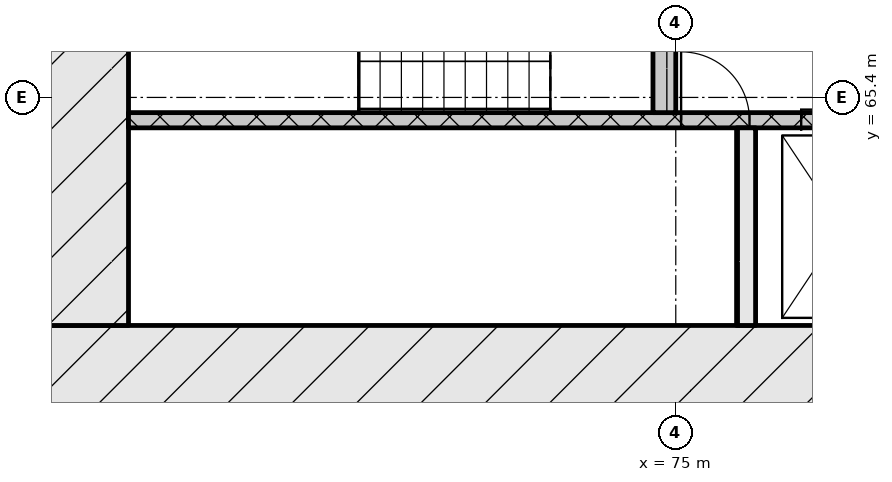
"""IFC4 building model, lengths in metres.
Left out: names, types, materials, properties, quantities, classifications, styles, units other than length and angle.
Written with IfcOpenShell. Run it as: python <this file> out.ifc"""

import sys

from ifc_helpers import new_model, si_unit, direction, frame, frame_2d, origin, place, context, subcontext, project, spatial, rectangle, extrude, element, fill, save


model = new_model("IFC4")
c1 = context("Model", 3, precision=1e-05, world=origin(), true_north=direction((0.0, 1.0)))
c2 = subcontext(c1, "Body", "Model", "MODEL_VIEW")
j1 = project(units=[si_unit("LENGTHUNIT", "METRE"), si_unit("PLANEANGLEUNIT", "RADIAN")], contexts=[c1])
p1 = place(None, origin())
s1 = spatial("IfcSite", under=j1, at=p1, CompositionType="ELEMENT")
p2 = place(p1, origin())
s2 = spatial("IfcBuilding", under=s1, at=p2, CompositionType="ELEMENT")
p3 = place(p2, frame((0.0, 0.0, 40.8)))
s3 = spatial("IfcBuildingStorey", under=s2, at=p3, CompositionType="ELEMENT", Elevation=40.8)
p4 = place(p3, frame((66.6, 61.8, 0.0), z_axis=(0.0, 0.0, 1.0), x_axis=(1.0, 0.0, 0.0)))
e1 = element("IfcWall", 1, at=p4, inside=s3, PredefinedType="SOLIDWALL", context=c2, shape_type="SweptSolid", body=[
    extrude(rectangle(XDim=42.0, YDim=1.2, at=frame_2d((21.0, 0.0))), origin(), (0.0, 0.0, 1.0), 3.32),
])
p5 = place(p4, frame((21.35, 0.0, 0.0)))
e2 = element("IfcOpeningElement", 2, at=p5, cuts=e1, PredefinedType="OPENING", context=c2, shape_type="SweptSolid", body=[
    extrude(rectangle(XDim=1.8, YDim=2.1, at=frame_2d((0.9, 1.05))), frame((0.0, 0.61, 0.0), z_axis=(0.0, -1.0, 0.0), x_axis=(1.0, 0.0, 0.0)), (0.0, 0.0, 1.0), 1.22),
])
p6 = place(p3, frame((67.2, 62.4, 0.0), z_axis=(0.0, 0.0, 1.0), x_axis=(0.0, 1.0, 0.0)))
e3 = element("IfcWall", 3, at=p6, inside=s3, PredefinedType="SOLIDWALL", context=c2, shape_type="SweptSolid", body=[
    extrude(rectangle(XDim=12.0, YDim=1.2, at=frame_2d((6.0, 0.0))), origin(), (0.0, 0.0, 1.0), 3.32),
])
p7 = place(p6, frame((6.45, 0.0, 0.0)))
e4 = element("IfcOpeningElement", 4, at=p7, cuts=e3, PredefinedType="OPENING", context=c2, shape_type="SweptSolid", body=[
    extrude(rectangle(XDim=1.2, YDim=2.1, at=frame_2d((0.6, 1.05))), frame((0.0, 0.61, 0.0), z_axis=(0.0, -1.0, 0.0), x_axis=(1.0, 0.0, 0.0)), (0.0, 0.0, 1.0), 1.22),
])
p8 = place(p3, frame((75.925, 62.4, 0.0), z_axis=(0.0, 0.0, 1.0), x_axis=(0.0, 1.0, 0.0)))
e5 = element("IfcWall", 5, at=p8, inside=s3, PredefinedType="SOLIDWALL", context=c2, shape_type="SweptSolid", body=[
    extrude(rectangle(XDim=2.6, YDim=0.25, at=frame_2d((1.3, 0.0))), origin(), (0.0, 0.0, 1.0), 3.32),
])
p9 = place(p3, frame((67.8, 65.1, 0.0), z_axis=(0.0, 0.0, 1.0), x_axis=(1.0, 0.0, 0.0)))
e6 = element("IfcWall", 6, at=p9, inside=s3, PredefinedType="SOLIDWALL", context=c2, shape_type="SweptSolid", body=[
    extrude(rectangle(XDim=18.5, YDim=0.2, at=frame_2d((9.25, 0.0))), origin(), (0.0, 0.0, 1.0), 3.32),
])
p10 = place(p9, frame((7.27, 0.0, 0.0)))
e7 = element("IfcOpeningElement", 7, at=p10, cuts=e6, PredefinedType="OPENING", context=c2, shape_type="SweptSolid", body=[
    extrude(rectangle(XDim=0.9, YDim=2.1, at=frame_2d((0.45, 1.05))), frame((0.0, 0.11, 0.0), z_axis=(0.0, -1.0, 0.0), x_axis=(1.0, 0.0, 0.0)), (0.0, 0.0, 1.0), 0.22),
])
p11 = place(p9, frame((8.85, 0.0, 0.0)))
e8 = element("IfcOpeningElement", 8, at=p11, cuts=e6, PredefinedType="OPENING", context=c2, shape_type="SweptSolid", body=[
    extrude(rectangle(XDim=1.1, YDim=2.1, at=frame_2d((0.55, 1.05))), frame((0.0, 0.11, 0.0), z_axis=(0.0, -1.0, 0.0), x_axis=(1.0, 0.0, 0.0)), (0.0, 0.0, 1.0), 0.22),
])
p12 = place(p9, frame((11.35, 0.0, 0.0)))
e9 = element("IfcOpeningElement", 9, at=p12, cuts=e6, PredefinedType="OPENING", context=c2, shape_type="SweptSolid", body=[
    extrude(rectangle(XDim=1.1, YDim=2.1, at=frame_2d((0.55, 1.05))), frame((0.0, 0.11, 0.0), z_axis=(0.0, -1.0, 0.0), x_axis=(1.0, 0.0, 0.0)), (0.0, 0.0, 1.0), 0.22),
])
p13 = place(p9, frame((13.85, 0.0, 0.0)))
e10 = element("IfcOpeningElement", 10, at=p13, cuts=e6, PredefinedType="OPENING", context=c2, shape_type="SweptSolid", body=[
    extrude(rectangle(XDim=1.1, YDim=2.1, at=frame_2d((0.55, 1.05))), frame((0.0, 0.11, 0.0), z_axis=(0.0, -1.0, 0.0), x_axis=(1.0, 0.0, 0.0)), (0.0, 0.0, 1.0), 0.22),
])
p14 = place(p9, frame((16.7, 0.0, 0.0)))
e11 = element("IfcOpeningElement", 11, at=p14, cuts=e6, PredefinedType="OPENING", context=c2, shape_type="SweptSolid", body=[
    extrude(rectangle(XDim=0.9, YDim=2.1, at=frame_2d((0.45, 1.05))), frame((0.0, 0.11, 0.0), z_axis=(0.0, -1.0, 0.0), x_axis=(1.0, 0.0, 0.0)), (0.0, 0.0, 1.0), 0.22),
])
p15 = place(p3, frame((74.85, 65.2, 0.0), z_axis=(0.0, 0.0, 1.0), x_axis=(0.0, 1.0, 0.0)))
e12 = element("IfcWall", 12, at=p15, inside=s3, PredefinedType="SOLIDWALL", context=c2, shape_type="SweptSolid", body=[
    extrude(rectangle(XDim=2.85, YDim=0.3, at=frame_2d((1.425, 0.0))), origin(), (0.0, 0.0, 1.0), 3.32),
])
p16 = place(p10, origin())
e13 = element("IfcDoor", 13, at=p16, inside=s3, OperationType="SINGLE_SWING_LEFT", PredefinedType="DOOR", context=c2, shape_type="SweptSolid", body=[
    extrude(rectangle(XDim=0.9, YDim=2.1, at=frame_2d((0.45, 1.05))), frame((0.0, 0.025, 0.0), z_axis=(0.0, -1.0, 0.0), x_axis=(1.0, 0.0, 0.0)), (0.0, 0.0, 1.0), 0.05),
])
fill(e7, e13)
p17 = place(p11, origin())
e14 = element("IfcDoor", 14, at=p17, inside=s3, OperationType="SLIDING_TO_LEFT", PredefinedType="DOOR", context=c2, shape_type="SweptSolid", body=[
    extrude(rectangle(XDim=1.1, YDim=2.1, at=frame_2d((0.55, 1.05))), frame((0.0, 0.025, 0.0), z_axis=(0.0, -1.0, 0.0), x_axis=(1.0, 0.0, 0.0)), (0.0, 0.0, 1.0), 0.05),
])
fill(e8, e14)
save(model, sys.argv[1])
